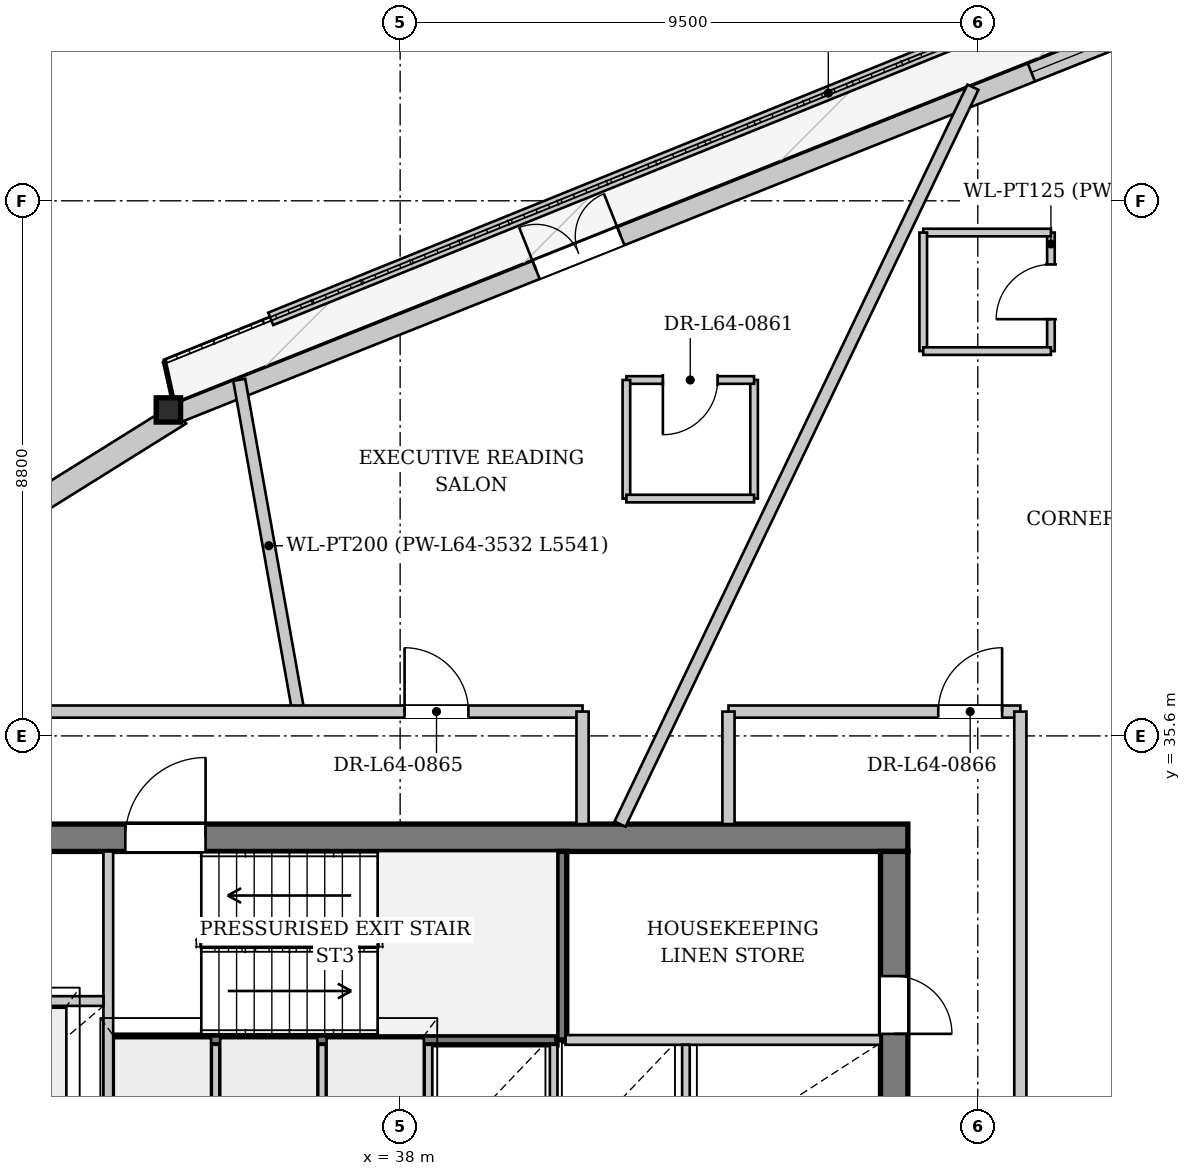
"""IFC4 building model, lengths in metres.
Left out: names, types, materials, properties, quantities, classifications, styles, units other than length and angle.
Written with IfcOpenShell. Run it as: python <this file> out.ifc"""

import sys

from ifc_helpers import new_model, si_unit, direction, frame, frame_2d, origin, origin_2d, place, context, subcontext, project, spatial, rectangle, i_section, extrude, source, transform, mapped, element, fill, save


model = new_model("IFC4")
c1 = context("Model", 3, precision=1e-05, world=origin(), true_north=direction((0.0, 1.0)))
c2 = subcontext(c1, "Body", "Model", "MODEL_VIEW")
j1 = project(units=[si_unit("LENGTHUNIT", "METRE"), si_unit("PLANEANGLEUNIT", "RADIAN")], contexts=[c1])
p1 = place(None, origin())
s1 = spatial("IfcSite", under=j1, at=p1, CompositionType="ELEMENT")
p2 = place(p1, origin())
s2 = spatial("IfcBuilding", under=s1, at=p2, CompositionType="ELEMENT")
p3 = place(p2, frame((0.0, 0.0, 241.7)))
s3 = spatial("IfcBuildingStorey", under=s2, at=p3, CompositionType="ELEMENT", Elevation=241.7)
m1 = source(origin(), c2, "Body", "SweptSolid", [
    extrude(i_section(OverallWidth=0.401, OverallDepth=0.399, WebThickness=0.022, FlangeThickness=0.034, at=origin_2d()), origin(), (0.0, 0.0, 1.0), 3.446),
])
p4 = place(p3, frame((34.279, 41.059, 0.0), z_axis=(-0.052577179651, -0.057112138543, 0.996982368857), x_axis=(0.735712662081, -0.67729379065, 0.0)))
e1 = element("IfcColumn", 1, at=p4, inside=s3, PredefinedType="COLUMN", context=c2, shape_type="MappedRepresentation", body=[
    mapped(m1, transform((0.0, 0.0, 0.0), x_axis=(1.0, 0.0, 0.0), y_axis=(0.0, 1.0, 0.0), z_axis=(0.0, 0.0, 1.0), scale=1.0)),
])
p5 = place(p3, frame((15.555, 29.152, 0.0), z_axis=(0.0, 0.0, 1.0), x_axis=(0.848386889954, 0.52937669476, 0.0)))
e2 = element("IfcWall", 2, at=p5, inside=s3, PredefinedType="SOLIDWALL", context=c2, shape_type="SweptSolid", body=[
    extrude(rectangle(XDim=22.188, YDim=0.38, at=frame_2d((11.094, 0.0))), origin(), (0.0, 0.0, 1.0), 2.872),
])
p6 = place(p5, frame((5.113, 0.0, 0.502)))
e3 = element("IfcOpeningElement", 3, at=p6, cuts=e2, PredefinedType="OPENING", context=c2, shape_type="SweptSolid", body=[
    extrude(rectangle(XDim=2.2, YDim=2.25, at=frame_2d((1.1, 1.125))), frame((0.0, 0.2, 0.0), z_axis=(0.0, -1.0, 0.0), x_axis=(1.0, 0.0, 0.0)), (0.0, 0.0, 1.0), 0.4),
])
p7 = place(p5, frame((14.876, 0.0, 0.502)))
e4 = element("IfcOpeningElement", 4, at=p7, cuts=e2, PredefinedType="OPENING", context=c2, shape_type="SweptSolid", body=[
    extrude(rectangle(XDim=2.2, YDim=2.25, at=frame_2d((1.1, 1.125))), frame((0.0, 0.2, 0.0), z_axis=(0.0, -1.0, 0.0), x_axis=(1.0, 0.0, 0.0)), (0.0, 0.0, 1.0), 0.4),
])
p8 = place(p3, frame((34.338, 40.91, 0.0), z_axis=(0.0, 0.0, 1.0), x_axis=(0.928854869218, 0.370443831005, 0.0)))
e5 = element("IfcWall", 5, at=p8, inside=s3, PredefinedType="SOLIDWALL", context=c2, shape_type="SweptSolid", body=[
    extrude(rectangle(XDim=22.188, YDim=0.32, at=frame_2d((11.094, 0.0))), origin(), (0.0, 0.0, 1.0), 2.872),
])
p9 = place(p8, frame((6.35, 0.0, 0.0)))
e6 = element("IfcOpeningElement", 6, at=p9, cuts=e5, PredefinedType="OPENING", context=c2, shape_type="SweptSolid", body=[
    extrude(rectangle(XDim=1.5, YDim=2.3, at=frame_2d((0.75, 1.15))), frame((0.0, 0.17, 0.0), z_axis=(0.0, -1.0, 0.0), x_axis=(1.0, 0.0, 0.0)), (0.0, 0.0, 1.0), 0.34),
])
p10 = place(p8, frame((15.119, 0.0, 0.402)))
e7 = element("IfcOpeningElement", 7, at=p10, cuts=e5, PredefinedType="OPENING", context=c2, shape_type="SweptSolid", body=[
    extrude(rectangle(XDim=2.6, YDim=2.35, at=frame_2d((1.3, 1.175))), frame((0.0, 0.17, 0.0), z_axis=(0.0, -1.0, 0.0), x_axis=(1.0, 0.0, 0.0)), (0.0, 0.0, 1.0), 0.34),
])
p11 = place(p3, frame((54.211, 49.883, 0.0), z_axis=(0.0, 0.0, 1.0), x_axis=(-0.926918098879, -0.375263691251, 0.0)))
e8 = element("IfcWall", 8, at=p11, inside=s3, PredefinedType="PARAPET", context=c2, shape_type="SweptSolid", body=[
    extrude(rectangle(XDim=19.786, YDim=0.22, at=frame_2d((9.893, 0.0))), origin(), (0.0, 0.0, 1.0), 0.3),
])
p12 = place(p3, frame((29.65, 33.925, 0.0), z_axis=(0.0, 0.0, 1.0), x_axis=(1.0, 0.0, 0.0)))
e9 = element("IfcWall", 9, at=p12, inside=s3, PredefinedType="SHEAR", context=c2, shape_type="SweptSolid", body=[
    extrude(rectangle(XDim=16.7, YDim=0.45, at=frame_2d((8.35, 0.0))), origin(), (0.0, 0.0, 1.0), 3.38),
])
p13 = place(p12, frame((1.45, 0.0, 0.0)))
e10 = element("IfcOpeningElement", 10, at=p13, cuts=e9, PredefinedType="OPENING", context=c2, shape_type="SweptSolid", body=[
    extrude(rectangle(XDim=0.95, YDim=2.1, at=frame_2d((0.475, 1.05))), frame((0.0, 0.235, 0.0), z_axis=(0.0, -1.0, 0.0), x_axis=(1.0, 0.0, 0.0)), (0.0, 0.0, 1.0), 0.47),
])
p14 = place(p12, frame((3.83, 0.0, 0.0)))
e11 = element("IfcOpeningElement", 11, at=p14, cuts=e9, PredefinedType="OPENING", context=c2, shape_type="SweptSolid", body=[
    extrude(rectangle(XDim=1.32, YDim=2.2, at=frame_2d((0.66, 1.1))), frame((0.0, 0.235, 0.0), z_axis=(0.0, -1.0, 0.0), x_axis=(1.0, 0.0, 0.0)), (0.0, 0.0, 1.0), 0.47),
])
p15 = place(p3, frame((46.125, 33.7, 0.0), z_axis=(0.0, 0.0, 1.0), x_axis=(0.0, -1.0, 0.0)))
e12 = element("IfcWall", 12, at=p15, inside=s3, PredefinedType="SHEAR", context=c2, shape_type="SweptSolid", body=[
    extrude(rectangle(XDim=14.2, YDim=0.45, at=frame_2d((7.1, 0.0))), origin(), (0.0, 0.0, 1.0), 3.38),
])
p16 = place(p15, frame((5.18, 0.0, 0.0)))
e13 = element("IfcOpeningElement", 13, at=p16, cuts=e12, PredefinedType="OPENING", context=c2, shape_type="SweptSolid", body=[
    extrude(rectangle(XDim=1.6, YDim=2.2, at=frame_2d((0.8, 1.1))), frame((0.0, 0.235, 0.0), z_axis=(0.0, -1.0, 0.0), x_axis=(1.0, 0.0, 0.0)), (0.0, 0.0, 1.0), 0.47),
])
p17 = place(p15, frame((2.05, 0.0, 0.0)))
e14 = element("IfcOpeningElement", 14, at=p17, cuts=e12, PredefinedType="OPENING", context=c2, shape_type="SweptSolid", body=[
    extrude(rectangle(XDim=0.95, YDim=2.1, at=frame_2d((0.475, 1.05))), frame((0.0, 0.235, 0.0), z_axis=(0.0, -1.0, 0.0), x_axis=(1.0, 0.0, 0.0)), (0.0, 0.0, 1.0), 0.47),
])
p18 = place(p3, frame((33.28, 30.6, 0.0), z_axis=(0.0, 0.0, 1.0), x_axis=(1.0, 0.0, 0.0)))
e15 = element("IfcWall", 15, at=p18, inside=s3, PredefinedType="PARTITIONING", context=c2, shape_type="SweptSolid", body=[
    extrude(rectangle(XDim=7.3, YDim=0.16, at=frame_2d((3.65, 0.0))), origin(), (0.0, 0.0, 1.0), 3.38),
])
p19 = place(p3, frame((40.66, 30.6, 0.0), z_axis=(0.0, 0.0, 1.0), x_axis=(0.0, 1.0, 0.0)))
e16 = element("IfcWall", 16, at=p19, inside=s3, PredefinedType="PARTITIONING", context=c2, shape_type="SweptSolid", body=[
    extrude(rectangle(XDim=3.1, YDim=0.16, at=frame_2d((1.55, 0.0))), origin(), (0.0, 0.0, 1.0), 3.38),
])
p20 = place(p3, frame((33.2, 28.44, 0.0), z_axis=(0.0, 0.0, 1.0), x_axis=(0.0, 1.0, 0.0)))
e17 = element("IfcWall", 17, at=p20, inside=s3, PredefinedType="PARTITIONING", context=c2, shape_type="SweptSolid", body=[
    extrude(rectangle(XDim=5.26, YDim=0.16, at=frame_2d((2.63, 0.0))), origin(), (0.0, 0.0, 1.0), 3.38),
])
p21 = place(p3, frame((30.1, 31.24, 0.0), z_axis=(0.0, 0.0, 1.0), x_axis=(1.0, 0.0, 0.0)))
e18 = element("IfcWall", 18, at=p21, inside=s3, PredefinedType="PARTITIONING", context=c2, shape_type="SweptSolid", body=[
    extrude(rectangle(XDim=3.02, YDim=0.16, at=frame_2d((1.51, 0.0))), origin(), (0.0, 0.0, 1.0), 3.38),
])
p22 = place(p21, frame((0.91, 0.0, 0.0)))
e19 = element("IfcOpeningElement", 19, at=p22, cuts=e18, PredefinedType="OPENING", context=c2, shape_type="SweptSolid", body=[
    extrude(rectangle(XDim=1.2, YDim=2.2, at=frame_2d((0.6, 1.1))), frame((0.0, 0.09, 0.0), z_axis=(0.0, -1.0, 0.0), x_axis=(1.0, 0.0, 0.0)), (0.0, 0.0, 1.0), 0.18),
])
p23 = place(p3, frame((40.72, 30.6, 0.0), z_axis=(0.0, 0.0, 1.0), x_axis=(1.0, 0.0, 0.0)))
e20 = element("IfcWall", 20, at=p23, inside=s3, PredefinedType="PARTITIONING", context=c2, shape_type="SweptSolid", body=[
    extrude(rectangle(XDim=5.18, YDim=0.16, at=frame_2d((2.59, 0.0))), origin(), (0.0, 0.0, 1.0), 3.38),
])
for number, where, z_axis, x_axis in (
    (21, (34.965, 28.6, 0.0), (0.0, 0.0, 1.0), (0.0, 1.0, 0.0)),
    (22, (36.715, 28.6, 0.0), (0.0, 0.0, 1.0), (0.0, 1.0, 0.0)),
    (23, (38.465, 28.6, 0.0), (0.0, 0.0, 1.0), (0.0, 1.0, 0.0)),
    (24, (40.525, 28.6, 0.0), (0.0, 0.0, 1.0), (0.0, 1.0, 0.0)),
    (25, (42.7, 28.6, 0.0), (0.0, 0.0, 1.0), (0.0, 1.0, 0.0)),
):
    element("IfcWall", number, at=place(p3, frame(where, z_axis=z_axis, x_axis=x_axis)), inside=s3, PredefinedType="PARTITIONING", context=c2, shape_type="SweptSolid", body=[
        extrude(rectangle(XDim=1.92, YDim=0.125, at=frame_2d((0.96, 0.0))), origin(), (0.0, 0.0, 1.0), 3.38),
    ])
p24 = place(p3, frame((36.326, 36.0, 0.0), z_axis=(0.0, 0.0, 1.0), x_axis=(-0.175356019098, 0.984505087121, 0.0)))
e26 = element("IfcWall", 26, at=p24, inside=s3, PredefinedType="PARTITIONING", context=c2, shape_type="SweptSolid", body=[
    extrude(rectangle(XDim=5.541, YDim=0.2, at=frame_2d((2.771, 0.0))), origin(), (0.0, 0.0, 1.0), 3.38),
])
p25 = place(p3, frame((41.616, 34.15, 0.0), z_axis=(0.0, 0.0, 1.0), x_axis=(0.43198071356, 0.90188284334, 0.0)))
e27 = element("IfcWall", 27, at=p25, inside=s3, PredefinedType="PARTITIONING", context=c2, shape_type="SweptSolid", body=[
    extrude(rectangle(XDim=13.436, YDim=0.2, at=frame_2d((6.718, 0.0))), origin(), (0.0, 0.0, 1.0), 3.38),
])
p26 = place(p3, frame((48.703, 41.928, 0.0), z_axis=(0.0, 0.0, 1.0), x_axis=(0.0, 1.0, 0.0)))
e28 = element("IfcWall", 28, at=p26, inside=s3, PredefinedType="PARTITIONING", context=c2, shape_type="SweptSolid", body=[
    extrude(rectangle(XDim=1.95, YDim=0.125, at=frame_2d((0.975, 0.0))), origin(), (0.0, 0.0, 1.0), 3.38),
])
p27 = place(p26, frame((0.525, 0.0, 0.0)))
e29 = element("IfcOpeningElement", 29, at=p27, cuts=e28, PredefinedType="OPENING", context=c2, shape_type="SweptSolid", body=[
    extrude(rectangle(XDim=0.9, YDim=2.1, at=frame_2d((0.45, 1.05))), frame((0.0, 0.073, 0.0), z_axis=(0.0, -1.0, 0.0), x_axis=(1.0, 0.0, 0.0)), (0.0, 0.0, 1.0), 0.145),
])
p28 = place(p3, frame((48.703, 43.878, 0.0), z_axis=(0.0, 0.0, 1.0), x_axis=(-1.0, 0.0, 0.0)))
e30 = element("IfcWall", 30, at=p28, inside=s3, PredefinedType="PARTITIONING", context=c2, shape_type="SweptSolid", body=[
    extrude(rectangle(XDim=2.1, YDim=0.125, at=frame_2d((1.05, 0.0))), origin(), (0.0, 0.0, 1.0), 3.38),
])
p29 = place(p3, frame((46.603, 43.878, 0.0), z_axis=(0.0, 0.0, 1.0), x_axis=(0.0, -1.0, 0.0)))
e31 = element("IfcWall", 31, at=p29, inside=s3, PredefinedType="PARTITIONING", context=c2, shape_type="SweptSolid", body=[
    extrude(rectangle(XDim=1.95, YDim=0.125, at=frame_2d((0.975, 0.0))), origin(), (0.0, 0.0, 1.0), 3.38),
])
p30 = place(p3, frame((46.603, 41.928, 0.0), z_axis=(0.0, 0.0, 1.0), x_axis=(1.0, 0.0, 0.0)))
e32 = element("IfcWall", 32, at=p30, inside=s3, PredefinedType="PARTITIONING", context=c2, shape_type="SweptSolid", body=[
    extrude(rectangle(XDim=2.1, YDim=0.125, at=frame_2d((1.05, 0.0))), origin(), (0.0, 0.0, 1.0), 3.065),
])
p31 = place(p3, frame((43.821, 39.503, 0.0), z_axis=(0.0, 0.0, 1.0), x_axis=(0.0, 1.0, 0.0)))
e33 = element("IfcWall", 33, at=p31, inside=s3, PredefinedType="PARTITIONING", context=c2, shape_type="SweptSolid", body=[
    extrude(rectangle(XDim=1.95, YDim=0.125, at=frame_2d((0.975, 0.0))), origin(), (0.0, 0.0, 1.0), 3.38),
])
p32 = place(p3, frame((43.821, 41.453, 0.0), z_axis=(0.0, 0.0, 1.0), x_axis=(-1.0, 0.0, 0.0)))
e34 = element("IfcWall", 34, at=p32, inside=s3, PredefinedType="PARTITIONING", context=c2, shape_type="SweptSolid", body=[
    extrude(rectangle(XDim=2.1, YDim=0.125, at=frame_2d((1.05, 0.0))), origin(), (0.0, 0.0, 1.0), 3.38),
])
p33 = place(p32, frame((0.6, 0.0, 0.0)))
e35 = element("IfcOpeningElement", 35, at=p33, cuts=e34, PredefinedType="OPENING", context=c2, shape_type="SweptSolid", body=[
    extrude(rectangle(XDim=0.9, YDim=2.1, at=frame_2d((0.45, 1.05))), frame((0.0, 0.073, 0.0), z_axis=(0.0, -1.0, 0.0), x_axis=(1.0, 0.0, 0.0)), (0.0, 0.0, 1.0), 0.145),
])
p34 = place(p3, frame((41.721, 41.453, 0.0), z_axis=(0.0, 0.0, 1.0), x_axis=(0.0, -1.0, 0.0)))
e36 = element("IfcWall", 36, at=p34, inside=s3, PredefinedType="PARTITIONING", context=c2, shape_type="SweptSolid", body=[
    extrude(rectangle(XDim=1.95, YDim=0.125, at=frame_2d((0.975, 0.0))), origin(), (0.0, 0.0, 1.0), 3.38),
])
p35 = place(p3, frame((41.721, 39.503, 0.0), z_axis=(0.0, 0.0, 1.0), x_axis=(1.0, 0.0, 0.0)))
e37 = element("IfcWall", 37, at=p35, inside=s3, PredefinedType="PARTITIONING", context=c2, shape_type="SweptSolid", body=[
    extrude(rectangle(XDim=2.1, YDim=0.125, at=frame_2d((1.05, 0.0))), origin(), (0.0, 0.0, 1.0), 3.38),
])
p36 = place(p3, frame((27.8, 36.0, 0.0), z_axis=(0.0, 0.0, 1.0), x_axis=(1.0, 0.0, 0.0)))
e38 = element("IfcWall", 38, at=p36, inside=s3, PredefinedType="PARTITIONING", context=c2, shape_type="SweptSolid", body=[
    extrude(rectangle(XDim=13.2, YDim=0.2, at=frame_2d((6.6, 0.0))), origin(), (0.0, 0.0, 1.0), 3.38),
])
p37 = place(p36, frame((0.3, 0.0, 0.0)))
e39 = element("IfcOpeningElement", 39, at=p37, cuts=e38, PredefinedType="OPENING", context=c2, shape_type="SweptSolid", body=[
    extrude(rectangle(XDim=1.05, YDim=2.2, at=frame_2d((0.525, 1.1))), frame((0.0, 0.11, 0.0), z_axis=(0.0, -1.0, 0.0), x_axis=(1.0, 0.0, 0.0)), (0.0, 0.0, 1.0), 0.22),
])
p38 = place(p36, frame((10.273, 0.0, 0.0)))
e40 = element("IfcOpeningElement", 40, at=p38, cuts=e38, PredefinedType="OPENING", context=c2, shape_type="SweptSolid", body=[
    extrude(rectangle(XDim=1.05, YDim=2.2, at=frame_2d((0.525, 1.1))), frame((0.0, 0.11, 0.0), z_axis=(0.0, -1.0, 0.0), x_axis=(1.0, 0.0, 0.0)), (0.0, 0.0, 1.0), 0.22),
])
p39 = place(p3, frame((41.0, 34.15, 0.0), z_axis=(0.0, 0.0, 1.0), x_axis=(0.0, 1.0, 0.0)))
e41 = element("IfcWall", 41, at=p39, inside=s3, PredefinedType="PARTITIONING", context=c2, shape_type="SweptSolid", body=[
    extrude(rectangle(XDim=1.85, YDim=0.2, at=frame_2d((0.925, 0.0))), origin(), (0.0, 0.0, 1.0), 3.38),
])
p40 = place(p3, frame((43.4, 36.0, 0.0), z_axis=(0.0, 0.0, 1.0), x_axis=(1.0, 0.0, 0.0)))
e42 = element("IfcWall", 42, at=p40, inside=s3, PredefinedType="PARTITIONING", context=c2, shape_type="SweptSolid", body=[
    extrude(rectangle(XDim=4.8, YDim=0.2, at=frame_2d((2.4, 0.0))), origin(), (0.0, 0.0, 1.0), 3.38),
])
p41 = place(p40, frame((3.45, 0.0, 0.0)))
e43 = element("IfcOpeningElement", 43, at=p41, cuts=e42, PredefinedType="OPENING", context=c2, shape_type="SweptSolid", body=[
    extrude(rectangle(XDim=1.05, YDim=2.2, at=frame_2d((0.525, 1.1))), frame((0.0, 0.11, 0.0), z_axis=(0.0, -1.0, 0.0), x_axis=(1.0, 0.0, 0.0)), (0.0, 0.0, 1.0), 0.22),
])
p42 = place(p3, frame((43.4, 34.15, 0.0), z_axis=(0.0, 0.0, 1.0), x_axis=(0.0, 1.0, 0.0)))
e44 = element("IfcWall", 44, at=p42, inside=s3, PredefinedType="PARTITIONING", context=c2, shape_type="SweptSolid", body=[
    extrude(rectangle(XDim=1.85, YDim=0.2, at=frame_2d((0.925, 0.0))), origin(), (0.0, 0.0, 1.0), 3.38),
])
p43 = place(p3, frame((48.2, 17.2, 0.0), z_axis=(0.0, 0.0, 1.0), x_axis=(0.0, 1.0, 0.0)))
e45 = element("IfcWall", 45, at=p43, inside=s3, PredefinedType="PARTITIONING", context=c2, shape_type="SweptSolid", body=[
    extrude(rectangle(XDim=18.8, YDim=0.2, at=frame_2d((9.4, 0.0))), origin(), (0.0, 0.0, 1.0), 3.005),
])
m2 = source(origin(), c2, "Body", "SweptSolid", [
    extrude(rectangle(XDim=1.5, YDim=2.3, at=frame_2d((0.75, 1.15))), frame((0.0, 0.025, 0.0), z_axis=(0.0, -1.0, 0.0), x_axis=(1.0, 0.0, 0.0)), (0.0, 0.0, 1.0), 0.05),
])
p44 = place(p9, origin())
e46 = element("IfcDoor", 46, at=p44, inside=s3, OperationType="DOUBLE_DOOR_SINGLE_SWING", PredefinedType="DOOR", context=c2, shape_type="MappedRepresentation", body=[
    mapped(m2, transform((0.0, 0.0, 0.0), x_axis=(1.0, 0.0, 0.0), y_axis=(0.0, 1.0, 0.0), z_axis=(0.0, 0.0, 1.0), scale=1.0)),
])
fill(e6, e46)
m3 = source(origin(), c2, "Body", "SweptSolid", [
    extrude(rectangle(XDim=2.6, YDim=2.35, at=frame_2d((1.3, 1.175))), frame((0.0, 0.03, 0.0), z_axis=(0.0, -1.0, 0.0), x_axis=(1.0, 0.0, 0.0)), (0.0, 0.0, 1.0), 0.06),
])
p45 = place(p10, origin())
e47 = element("IfcWindow", 47, at=p45, inside=s3, PartitioningType="SINGLE_PANEL", PredefinedType="WINDOW", context=c2, shape_type="MappedRepresentation", body=[
    mapped(m3, transform((0.0, 0.0, 0.0), x_axis=(1.0, 0.0, 0.0), y_axis=(0.0, 1.0, 0.0), z_axis=(0.0, 0.0, 1.0), scale=1.0)),
])
fill(e7, e47)
m4 = source(origin(), c2, "Body", "SweptSolid", [
    extrude(rectangle(XDim=1.32, YDim=2.2, at=frame_2d((0.66, 1.1))), frame((0.0, 0.025, 0.0), z_axis=(0.0, -1.0, 0.0), x_axis=(1.0, 0.0, 0.0)), (0.0, 0.0, 1.0), 0.05),
])
p46 = place(p14, origin())
e48 = element("IfcDoor", 48, at=p46, inside=s3, OperationType="SINGLE_SWING_RIGHT", PredefinedType="DOOR", context=c2, shape_type="MappedRepresentation", body=[
    mapped(m4, transform((0.0, 0.0, 0.0), x_axis=(1.0, 0.0, 0.0), y_axis=(0.0, 1.0, 0.0), z_axis=(0.0, 0.0, 1.0), scale=1.0)),
])
fill(e11, e48)
m5 = source(origin(), c2, "Body", "SweptSolid", [
    extrude(rectangle(XDim=0.95, YDim=2.1, at=frame_2d((0.475, 1.05))), frame((0.0, 0.025, 0.0), z_axis=(0.0, -1.0, 0.0), x_axis=(1.0, 0.0, 0.0)), (0.0, 0.0, 1.0), 0.05),
])
p47 = place(p17, origin())
e49 = element("IfcDoor", 49, at=p47, inside=s3, OperationType="SINGLE_SWING_RIGHT", PredefinedType="DOOR", context=c2, shape_type="MappedRepresentation", body=[
    mapped(m5, transform((0.0, 0.0, 0.0), x_axis=(1.0, 0.0, 0.0), y_axis=(0.0, 1.0, 0.0), z_axis=(0.0, 0.0, 1.0), scale=1.0)),
])
fill(e14, e49)
m6 = source(origin(), c2, "Body", "SweptSolid", [
    extrude(rectangle(XDim=0.9, YDim=2.1, at=frame_2d((0.45, 1.05))), frame((0.0, 0.025, 0.0), z_axis=(0.0, -1.0, 0.0), x_axis=(1.0, 0.0, 0.0)), (0.0, 0.0, 1.0), 0.05),
])
p48 = place(p27, origin())
e50 = element("IfcDoor", 50, at=p48, inside=s3, OperationType="SINGLE_SWING_LEFT", PredefinedType="DOOR", context=c2, shape_type="MappedRepresentation", body=[
    mapped(m6, transform((0.0, 0.0, 0.0), x_axis=(1.0, 0.0, 0.0), y_axis=(0.0, 1.0, 0.0), z_axis=(0.0, 0.0, 1.0), scale=1.0)),
])
fill(e29, e50)
p49 = place(p33, origin())
e51 = element("IfcDoor", 51, at=p49, inside=s3, OperationType="SINGLE_SWING_RIGHT", PredefinedType="DOOR", context=c2, shape_type="MappedRepresentation", body=[
    mapped(m6, transform((0.0, 0.0, 0.0), x_axis=(1.0, 0.0, 0.0), y_axis=(0.0, 1.0, 0.0), z_axis=(0.0, 0.0, 1.0), scale=1.0)),
])
fill(e35, e51)
m7 = source(origin(), c2, "Body", "SweptSolid", [
    extrude(rectangle(XDim=1.05, YDim=2.2, at=frame_2d((0.525, 1.1))), frame((0.0, 0.025, 0.0), z_axis=(0.0, -1.0, 0.0), x_axis=(1.0, 0.0, 0.0)), (0.0, 0.0, 1.0), 0.05),
])
p50 = place(p38, origin())
e52 = element("IfcDoor", 52, at=p50, inside=s3, OperationType="SINGLE_SWING_LEFT", PredefinedType="DOOR", context=c2, shape_type="MappedRepresentation", body=[
    mapped(m7, transform((0.0, 0.0, 0.0), x_axis=(1.0, 0.0, 0.0), y_axis=(0.0, 1.0, 0.0), z_axis=(0.0, 0.0, 1.0), scale=1.0)),
])
fill(e40, e52)
p51 = place(p41, origin())
e53 = element("IfcDoor", 53, at=p51, inside=s3, OperationType="SINGLE_SWING_RIGHT", PredefinedType="DOOR", context=c2, shape_type="MappedRepresentation", body=[
    mapped(m7, transform((0.0, 0.0, 0.0), x_axis=(1.0, 0.0, 0.0), y_axis=(0.0, 1.0, 0.0), z_axis=(0.0, 0.0, 1.0), scale=1.0)),
])
fill(e43, e53)
save(model, sys.argv[1])
